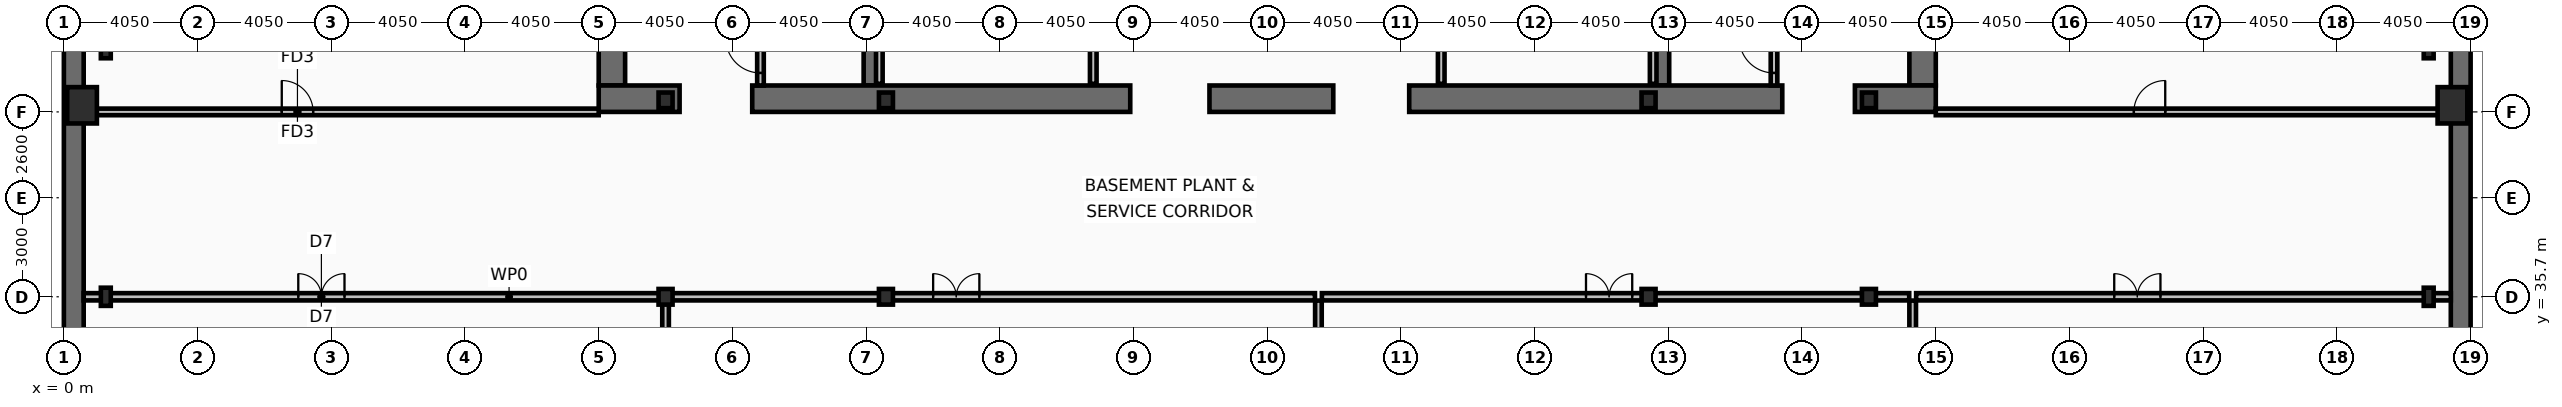
"""IFC4 building model, lengths in metres.
Left out: names, types, materials, properties, quantities, classifications, styles, units other than length and angle.
Written with IfcOpenShell. Run it as: python <this file> out.ifc"""

import sys

from ifc_helpers import new_model, si_unit, direction, frame, frame_2d, origin, origin_2d, place, context, subcontext, project, spatial, rectangle, i_section, extrude, element, fill, save


model = new_model("IFC4")
c1 = context("Model", 3, precision=1e-05, world=origin(), true_north=direction((0.0, 1.0)))
c2 = subcontext(c1, "Body", "Model", "MODEL_VIEW")
j1 = project(units=[si_unit("LENGTHUNIT", "METRE"), si_unit("PLANEANGLEUNIT", "RADIAN")], contexts=[c1])
p1 = place(None, origin())
s1 = spatial("IfcSite", under=j1, at=p1, CompositionType="ELEMENT")
p2 = place(p1, origin())
s2 = spatial("IfcBuilding", under=s1, at=p2, CompositionType="ELEMENT")
p3 = place(p2, frame((0.0, 0.0, -9.0)))
s3 = spatial("IfcBuildingStorey", under=s2, at=p3, CompositionType="ELEMENT", Elevation=-9.0)
for number, where, z_axis, x_axis in (
    (1, (0.3, 0.0, -0.2), (0.0, 0.0, 1.0), (0.0, 1.0, 0.0)),
    (2, (72.6, 53.7, -0.2), (0.0, 0.0, 1.0), (0.0, -1.0, 0.0)),
):
    element("IfcWall", number, at=place(p3, frame(where, z_axis=z_axis, x_axis=x_axis)), inside=s3, PredefinedType="SOLIDWALL", context=c2, shape_type="SweptSolid", body=[
        extrude(rectangle(XDim=53.7, YDim=0.6, at=frame_2d((26.85, 0.0))), origin(), (0.0, 0.0, 1.0), 4.48),
    ])
for number, where, z_axis, x_axis in (
    (3, (16.6, 42.1, -0.2), (0.0, 0.0, 1.0), (0.0, 1.0, 0.0)),
    (4, (56.3, 52.9, -0.2), (0.0, 0.0, 1.0), (0.0, -1.0, 0.0)),
):
    element("IfcWall", number, at=place(p3, frame(where, z_axis=z_axis, x_axis=x_axis)), inside=s3, PredefinedType="SHEAR", context=c2, shape_type="SweptSolid", body=[
        extrude(rectangle(XDim=10.8, YDim=0.8, at=frame_2d((5.4, 0.0))), origin(), (0.0, 0.0, 1.0), 4.48),
    ])
for number, where, z_axis, x_axis in (
    (5, (24.45, 42.1, -0.2), (0.0, 0.0, 1.0), (0.0, 1.0, 0.0)),
    (6, (48.4, 42.1, -0.2), (0.0, 0.0, 1.0), (0.0, 1.0, 0.0)),
):
    element("IfcWall", number, at=place(p3, frame(where, z_axis=z_axis, x_axis=x_axis)), inside=s3, PredefinedType="SHEAR", context=c2, shape_type="SweptSolid", body=[
        extrude(rectangle(XDim=10.8, YDim=0.45, at=frame_2d((5.4, 0.0))), origin(), (0.0, 0.0, 1.0), 4.48),
    ])
p4 = place(p3, frame((18.65, 41.7, -0.2), z_axis=(0.0, 0.0, 1.0), x_axis=(-1.0, 0.0, 0.0)))
e7 = element("IfcWall", 7, at=p4, inside=s3, PredefinedType="SHEAR", context=c2, shape_type="SweptSolid", body=[
    extrude(rectangle(XDim=2.45, YDim=0.8, at=frame_2d((1.225, 0.0))), origin(), (0.0, 0.0, 1.0), 4.48),
])
p5 = place(p3, frame((32.3, 41.7, -0.2), z_axis=(0.0, 0.0, 1.0), x_axis=(-1.0, 0.0, 0.0)))
e8 = element("IfcWall", 8, at=p5, inside=s3, PredefinedType="SHEAR", context=c2, shape_type="SweptSolid", body=[
    extrude(rectangle(XDim=11.45, YDim=0.8, at=frame_2d((5.725, 0.0))), origin(), (0.0, 0.0, 1.0), 4.48),
])
p6 = place(p3, frame((38.45, 41.7, -0.2), z_axis=(0.0, 0.0, 1.0), x_axis=(-1.0, 0.0, 0.0)))
e9 = element("IfcWall", 9, at=p6, inside=s3, PredefinedType="SHEAR", context=c2, shape_type="SweptSolid", body=[
    extrude(rectangle(XDim=3.75, YDim=0.8, at=frame_2d((1.875, 0.0))), origin(), (0.0, 0.0, 1.0), 4.48),
])
p7 = place(p3, frame((52.05, 41.7, -0.2), z_axis=(0.0, 0.0, 1.0), x_axis=(-1.0, 0.0, 0.0)))
e10 = element("IfcWall", 10, at=p7, inside=s3, PredefinedType="SHEAR", context=c2, shape_type="SweptSolid", body=[
    extrude(rectangle(XDim=11.3, YDim=0.8, at=frame_2d((5.65, 0.0))), origin(), (0.0, 0.0, 1.0), 4.48),
])
p8 = place(p3, frame((56.7, 41.7, -0.2), z_axis=(0.0, 0.0, 1.0), x_axis=(-1.0, 0.0, 0.0)))
e11 = element("IfcWall", 11, at=p8, inside=s3, PredefinedType="SHEAR", context=c2, shape_type="SweptSolid", body=[
    extrude(rectangle(XDim=2.45, YDim=0.8, at=frame_2d((1.225, 0.0))), origin(), (0.0, 0.0, 1.0), 4.48),
])
for number, where, z_axis, x_axis in (
    (12, (1.27, 35.7, -0.2), (0.0, 0.0, 1.0), (1.0, 0.0, 0.0)),
    (13, (1.27, 43.2, -0.2), (0.0, 0.0, 1.0), (1.0, 0.0, 0.0)),
    (14, (71.63, 35.7, -0.2), (0.0, 0.0, 1.0), (1.0, 0.0, 0.0)),
    (15, (71.63, 43.2, -0.2), (0.0, 0.0, 1.0), (1.0, 0.0, 0.0)),
):
    element("IfcColumn", number, at=place(p3, frame(where, z_axis=z_axis, x_axis=x_axis)), inside=s3, PredefinedType="COLUMN", context=c2, shape_type="SweptSolid", body=[
        extrude(i_section(OverallWidth=0.3, OverallDepth=0.55, WebThickness=0.015, FlangeThickness=0.029, at=origin_2d()), origin(), (0.0, 0.0, 1.0), 4.7),
    ])
for number, where, z_axis, x_axis in (
    (16, (18.225, 35.7, -0.2), (0.0, 0.0, 1.0), (1.0, 0.0, 0.0)),
    (17, (18.225, 41.65, -0.2), (0.0, 0.0, 1.0), (1.0, 0.0, 0.0)),
    (18, (24.9, 35.7, -0.2), (0.0, 0.0, 1.0), (1.0, 0.0, 0.0)),
    (19, (24.9, 41.65, -0.2), (0.0, 0.0, 1.0), (1.0, 0.0, 0.0)),
    (20, (48.0, 35.7, -0.2), (0.0, 0.0, 1.0), (1.0, 0.0, 0.0)),
    (21, (48.0, 41.65, -0.2), (0.0, 0.0, 1.0), (1.0, 0.0, 0.0)),
    (22, (54.675, 35.7, -0.2), (0.0, 0.0, 1.0), (1.0, 0.0, 0.0)),
    (23, (54.675, 41.65, -0.2), (0.0, 0.0, 1.0), (1.0, 0.0, 0.0)),
):
    element("IfcColumn", number, at=place(p3, frame(where, z_axis=z_axis, x_axis=x_axis)), inside=s3, PredefinedType="COLUMN", context=c2, shape_type="SweptSolid", body=[
        extrude(i_section(OverallWidth=0.424, OverallDepth=0.474, WebThickness=0.048, FlangeThickness=0.077, at=origin_2d()), origin(), (0.0, 0.0, 1.0), 4.7),
    ])
for number, where, z_axis, x_axis in (
    (24, (0.55, 41.5, -0.2), (0.0, 0.0, 1.0), (1.0, 0.0, 0.0)),
    (25, (72.35, 41.5, -0.2), (0.0, 0.0, 1.0), (1.0, 0.0, 0.0)),
):
    element("IfcColumn", number, at=place(p3, frame(where, z_axis=z_axis, x_axis=x_axis)), inside=s3, PredefinedType="PILASTER", context=c2, shape_type="SweptSolid", body=[
        extrude(rectangle(XDim=0.9, YDim=1.1, at=origin_2d()), origin(), (0.0, 0.0, 1.0), 4.7),
    ])
p9 = place(p3, frame((21.1, 42.1, 0.0), z_axis=(0.0, 0.0, 1.0), x_axis=(0.0, 1.0, 0.0)))
e26 = element("IfcWall", 26, at=p9, inside=s3, PredefinedType="PARTITIONING", context=c2, shape_type="SweptSolid", body=[
    extrude(rectangle(XDim=2.395, YDim=0.2, at=frame_2d((1.198, 0.0))), origin(), (0.0, 0.0, 1.0), 4.28),
])
p10 = place(p9, frame((0.38, 0.0, 0.0)))
e27 = element("IfcOpeningElement", 27, at=p10, cuts=e26, PredefinedType="OPENING", context=c2, shape_type="SweptSolid", body=[
    extrude(rectangle(XDim=1.05, YDim=2.15, at=frame_2d((0.525, 1.075))), frame((0.0, 0.11, 0.0), z_axis=(0.0, -1.0, 0.0), x_axis=(1.0, 0.0, 0.0)), (0.0, 0.0, 1.0), 0.22),
])
p11 = place(p3, frame((51.8, 42.1, 0.0), z_axis=(0.0, 0.0, 1.0), x_axis=(0.0, 1.0, 0.0)))
e28 = element("IfcWall", 28, at=p11, inside=s3, PredefinedType="PARTITIONING", context=c2, shape_type="SweptSolid", body=[
    extrude(rectangle(XDim=2.395, YDim=0.2, at=frame_2d((1.198, 0.0))), origin(), (0.0, 0.0, 1.0), 4.28),
])
p12 = place(p11, frame((0.38, 0.0, 0.0)))
e29 = element("IfcOpeningElement", 29, at=p12, cuts=e28, PredefinedType="OPENING", context=c2, shape_type="SweptSolid", body=[
    extrude(rectangle(XDim=1.05, YDim=2.15, at=frame_2d((0.525, 1.075))), frame((0.0, 0.11, 0.0), z_axis=(0.0, -1.0, 0.0), x_axis=(1.0, 0.0, 0.0)), (0.0, 0.0, 1.0), 0.22),
])
for number, where, z_axis, x_axis in (
    (30, (24.7, 42.15, 0.0), (0.0, 0.0, 1.0), (0.0, 1.0, 0.0)),
    (31, (31.18, 42.15, 0.0), (0.0, 0.0, 1.0), (0.0, 1.0, 0.0)),
    (32, (41.72, 42.15, 0.0), (0.0, 0.0, 1.0), (0.0, 1.0, 0.0)),
    (33, (48.14, 42.15, 0.0), (0.0, 0.0, 1.0), (0.0, 1.0, 0.0)),
):
    element("IfcWall", number, at=place(p3, frame(where, z_axis=z_axis, x_axis=x_axis)), inside=s3, PredefinedType="PARTITIONING", context=c2, shape_type="SweptSolid", body=[
        extrude(rectangle(XDim=2.095, YDim=0.2, at=frame_2d((1.048, 0.0))), origin(), (0.0, 0.0, 1.0), 4.28),
    ])
p13 = place(p3, frame((0.6, 35.7, 0.0), z_axis=(0.0, 0.0, 1.0), x_axis=(1.0, 0.0, 0.0)))
e34 = element("IfcWall", 34, at=p13, inside=s3, PredefinedType="PARTITIONING", context=c2, shape_type="SweptSolid", body=[
    extrude(rectangle(XDim=17.52, YDim=0.22, at=frame_2d((8.76, 0.0))), origin(), (0.0, 0.0, 1.0), 3.37),
])
p14 = place(p13, frame((6.5, 0.0, 0.0)))
e35 = element("IfcOpeningElement", 35, at=p14, cuts=e34, PredefinedType="OPENING", context=c2, shape_type="SweptSolid", body=[
    extrude(rectangle(XDim=1.4, YDim=2.15, at=frame_2d((0.7, 1.075))), frame((0.0, 0.12, 0.0), z_axis=(0.0, -1.0, 0.0), x_axis=(1.0, 0.0, 0.0)), (0.0, 0.0, 1.0), 0.24),
])
p15 = place(p3, frame((18.33, 35.7, 0.0), z_axis=(0.0, 0.0, 1.0), x_axis=(1.0, 0.0, 0.0)))
e36 = element("IfcWall", 36, at=p15, inside=s3, PredefinedType="PARTITIONING", context=c2, shape_type="SweptSolid", body=[
    extrude(rectangle(XDim=19.565, YDim=0.22, at=frame_2d((9.782, 0.0))), origin(), (0.0, 0.0, 1.0), 3.37),
])
p16 = place(p15, frame((8.0, 0.0, 0.0)))
e37 = element("IfcOpeningElement", 37, at=p16, cuts=e36, PredefinedType="OPENING", context=c2, shape_type="SweptSolid", body=[
    extrude(rectangle(XDim=1.4, YDim=2.15, at=frame_2d((0.7, 1.075))), frame((0.0, 0.12, 0.0), z_axis=(0.0, -1.0, 0.0), x_axis=(1.0, 0.0, 0.0)), (0.0, 0.0, 1.0), 0.24),
])
p17 = place(p3, frame((38.105, 35.7, 0.0), z_axis=(0.0, 0.0, 1.0), x_axis=(1.0, 0.0, 0.0)))
e38 = element("IfcWall", 38, at=p17, inside=s3, PredefinedType="PARTITIONING", context=c2, shape_type="SweptSolid", body=[
    extrude(rectangle(XDim=17.79, YDim=0.22, at=frame_2d((8.895, 0.0))), origin(), (0.0, 0.0, 1.0), 3.37),
])
p18 = place(p17, frame((8.0, 0.0, 0.0)))
e39 = element("IfcOpeningElement", 39, at=p18, cuts=e38, PredefinedType="OPENING", context=c2, shape_type="SweptSolid", body=[
    extrude(rectangle(XDim=1.4, YDim=2.15, at=frame_2d((0.7, 1.075))), frame((0.0, 0.12, 0.0), z_axis=(0.0, -1.0, 0.0), x_axis=(1.0, 0.0, 0.0)), (0.0, 0.0, 1.0), 0.24),
])
p19 = place(p3, frame((56.105, 35.7, 0.0), z_axis=(0.0, 0.0, 1.0), x_axis=(1.0, 0.0, 0.0)))
e40 = element("IfcWall", 40, at=p19, inside=s3, PredefinedType="PARTITIONING", context=c2, shape_type="SweptSolid", body=[
    extrude(rectangle(XDim=16.195, YDim=0.22, at=frame_2d((8.098, 0.0))), origin(), (0.0, 0.0, 1.0), 3.62),
])
p20 = place(p19, frame((6.0, 0.0, 0.0)))
e41 = element("IfcOpeningElement", 41, at=p20, cuts=e40, PredefinedType="OPENING", context=c2, shape_type="SweptSolid", body=[
    extrude(rectangle(XDim=1.4, YDim=2.15, at=frame_2d((0.7, 1.075))), frame((0.0, 0.12, 0.0), z_axis=(0.0, -1.0, 0.0), x_axis=(1.0, 0.0, 0.0)), (0.0, 0.0, 1.0), 0.24),
])
p21 = place(p3, frame((18.225, 0.6, 0.0), z_axis=(0.0, 0.0, 1.0), x_axis=(0.0, 1.0, 0.0)))
e42 = element("IfcWall", 42, at=p21, inside=s3, PredefinedType="PARTITIONING", context=c2, shape_type="SweptSolid", body=[
    extrude(rectangle(XDim=34.985, YDim=0.2, at=frame_2d((17.492, 0.0))), origin(), (0.0, 0.0, 1.0), 3.37),
])
p22 = place(p3, frame((38.0, 0.6, 0.0), z_axis=(0.0, 0.0, 1.0), x_axis=(0.0, 1.0, 0.0)))
e43 = element("IfcWall", 43, at=p22, inside=s3, PredefinedType="PARTITIONING", context=c2, shape_type="SweptSolid", body=[
    extrude(rectangle(XDim=34.985, YDim=0.2, at=frame_2d((17.492, 0.0))), origin(), (0.0, 0.0, 1.0), 3.62),
])
p23 = place(p3, frame((56.0, 0.6, 0.0), z_axis=(0.0, 0.0, 1.0), x_axis=(0.0, 1.0, 0.0)))
e44 = element("IfcWall", 44, at=p23, inside=s3, PredefinedType="PARTITIONING", context=c2, shape_type="SweptSolid", body=[
    extrude(rectangle(XDim=34.985, YDim=0.2, at=frame_2d((17.492, 0.0))), origin(), (0.0, 0.0, 1.0), 3.37),
])
p24 = place(p3, frame((0.6, 41.3, 0.0), z_axis=(0.0, 0.0, 1.0), x_axis=(1.0, 0.0, 0.0)))
e45 = element("IfcWall", 45, at=p24, inside=s3, PredefinedType="PARTITIONING", context=c2, shape_type="SweptSolid", body=[
    extrude(rectangle(XDim=15.6, YDim=0.2, at=frame_2d((7.8, 0.0))), origin(), (0.0, 0.0, 1.0), 3.62),
])
p25 = place(p24, frame((6.0, 0.0, 0.0)))
e46 = element("IfcOpeningElement", 46, at=p25, cuts=e45, PredefinedType="OPENING", context=c2, shape_type="SweptSolid", body=[
    extrude(rectangle(XDim=0.95, YDim=2.1, at=frame_2d((0.475, 1.05))), frame((0.0, 0.11, 0.0), z_axis=(0.0, -1.0, 0.0), x_axis=(1.0, 0.0, 0.0)), (0.0, 0.0, 1.0), 0.22),
])
p26 = place(p3, frame((56.7, 41.3, 0.0), z_axis=(0.0, 0.0, 1.0), x_axis=(1.0, 0.0, 0.0)))
e47 = element("IfcWall", 47, at=p26, inside=s3, PredefinedType="PARTITIONING", context=c2, shape_type="SweptSolid", body=[
    extrude(rectangle(XDim=15.6, YDim=0.2, at=frame_2d((7.8, 0.0))), origin(), (0.0, 0.0, 1.0), 3.62),
])
p27 = place(p26, frame((6.0, 0.0, 0.0)))
e48 = element("IfcOpeningElement", 48, at=p27, cuts=e47, PredefinedType="OPENING", context=c2, shape_type="SweptSolid", body=[
    extrude(rectangle(XDim=0.95, YDim=2.1, at=frame_2d((0.475, 1.05))), frame((0.0, 0.11, 0.0), z_axis=(0.0, -1.0, 0.0), x_axis=(1.0, 0.0, 0.0)), (0.0, 0.0, 1.0), 0.22),
])
p28 = place(p10, origin())
e49 = element("IfcDoor", 49, at=p28, inside=s3, OperationType="SINGLE_SWING_RIGHT", PredefinedType="DOOR", context=c2, shape_type="SweptSolid", body=[
    extrude(rectangle(XDim=1.05, YDim=2.15, at=frame_2d((0.525, 1.075))), frame((0.0, 0.025, 0.0), z_axis=(0.0, -1.0, 0.0), x_axis=(1.0, 0.0, 0.0)), (0.0, 0.0, 1.0), 0.05),
])
fill(e27, e49)
p29 = place(p12, origin())
e50 = element("IfcDoor", 50, at=p29, inside=s3, OperationType="SINGLE_SWING_RIGHT", PredefinedType="DOOR", context=c2, shape_type="SweptSolid", body=[
    extrude(rectangle(XDim=1.05, YDim=2.15, at=frame_2d((0.525, 1.075))), frame((0.0, 0.025, 0.0), z_axis=(0.0, -1.0, 0.0), x_axis=(1.0, 0.0, 0.0)), (0.0, 0.0, 1.0), 0.05),
])
fill(e29, e50)
p30 = place(p14, origin())
e51 = element("IfcDoor", 51, at=p30, inside=s3, OperationType="DOUBLE_DOOR_SINGLE_SWING", PredefinedType="DOOR", context=c2, shape_type="SweptSolid", body=[
    extrude(rectangle(XDim=1.4, YDim=2.15, at=frame_2d((0.7, 1.075))), frame((0.0, 0.025, 0.0), z_axis=(0.0, -1.0, 0.0), x_axis=(1.0, 0.0, 0.0)), (0.0, 0.0, 1.0), 0.05),
])
fill(e35, e51)
p31 = place(p16, origin())
e52 = element("IfcDoor", 52, at=p31, inside=s3, OperationType="DOUBLE_DOOR_SINGLE_SWING", PredefinedType="DOOR", context=c2, shape_type="SweptSolid", body=[
    extrude(rectangle(XDim=1.4, YDim=2.15, at=frame_2d((0.7, 1.075))), frame((0.0, 0.025, 0.0), z_axis=(0.0, -1.0, 0.0), x_axis=(1.0, 0.0, 0.0)), (0.0, 0.0, 1.0), 0.05),
])
fill(e37, e52)
p32 = place(p18, origin())
e53 = element("IfcDoor", 53, at=p32, inside=s3, OperationType="DOUBLE_DOOR_SINGLE_SWING", PredefinedType="DOOR", context=c2, shape_type="SweptSolid", body=[
    extrude(rectangle(XDim=1.4, YDim=2.15, at=frame_2d((0.7, 1.075))), frame((0.0, 0.025, 0.0), z_axis=(0.0, -1.0, 0.0), x_axis=(1.0, 0.0, 0.0)), (0.0, 0.0, 1.0), 0.05),
])
fill(e39, e53)
p33 = place(p20, origin())
e54 = element("IfcDoor", 54, at=p33, inside=s3, OperationType="DOUBLE_DOOR_SINGLE_SWING", PredefinedType="DOOR", context=c2, shape_type="SweptSolid", body=[
    extrude(rectangle(XDim=1.4, YDim=2.15, at=frame_2d((0.7, 1.075))), frame((0.0, 0.025, 0.0), z_axis=(0.0, -1.0, 0.0), x_axis=(1.0, 0.0, 0.0)), (0.0, 0.0, 1.0), 0.05),
])
fill(e41, e54)
p34 = place(p25, origin())
e55 = element("IfcDoor", 55, at=p34, inside=s3, OperationType="SINGLE_SWING_LEFT", PredefinedType="DOOR", context=c2, shape_type="SweptSolid", body=[
    extrude(rectangle(XDim=0.95, YDim=2.1, at=frame_2d((0.475, 1.05))), frame((0.0, 0.025, 0.0), z_axis=(0.0, -1.0, 0.0), x_axis=(1.0, 0.0, 0.0)), (0.0, 0.0, 1.0), 0.05),
])
fill(e46, e55)
p35 = place(p27, origin())
e56 = element("IfcDoor", 56, at=p35, inside=s3, OperationType="SINGLE_SWING_RIGHT", PredefinedType="DOOR", context=c2, shape_type="SweptSolid", body=[
    extrude(rectangle(XDim=0.95, YDim=2.1, at=frame_2d((0.475, 1.05))), frame((0.0, 0.025, 0.0), z_axis=(0.0, -1.0, 0.0), x_axis=(1.0, 0.0, 0.0)), (0.0, 0.0, 1.0), 0.05),
])
fill(e48, e56)
save(model, sys.argv[1])
